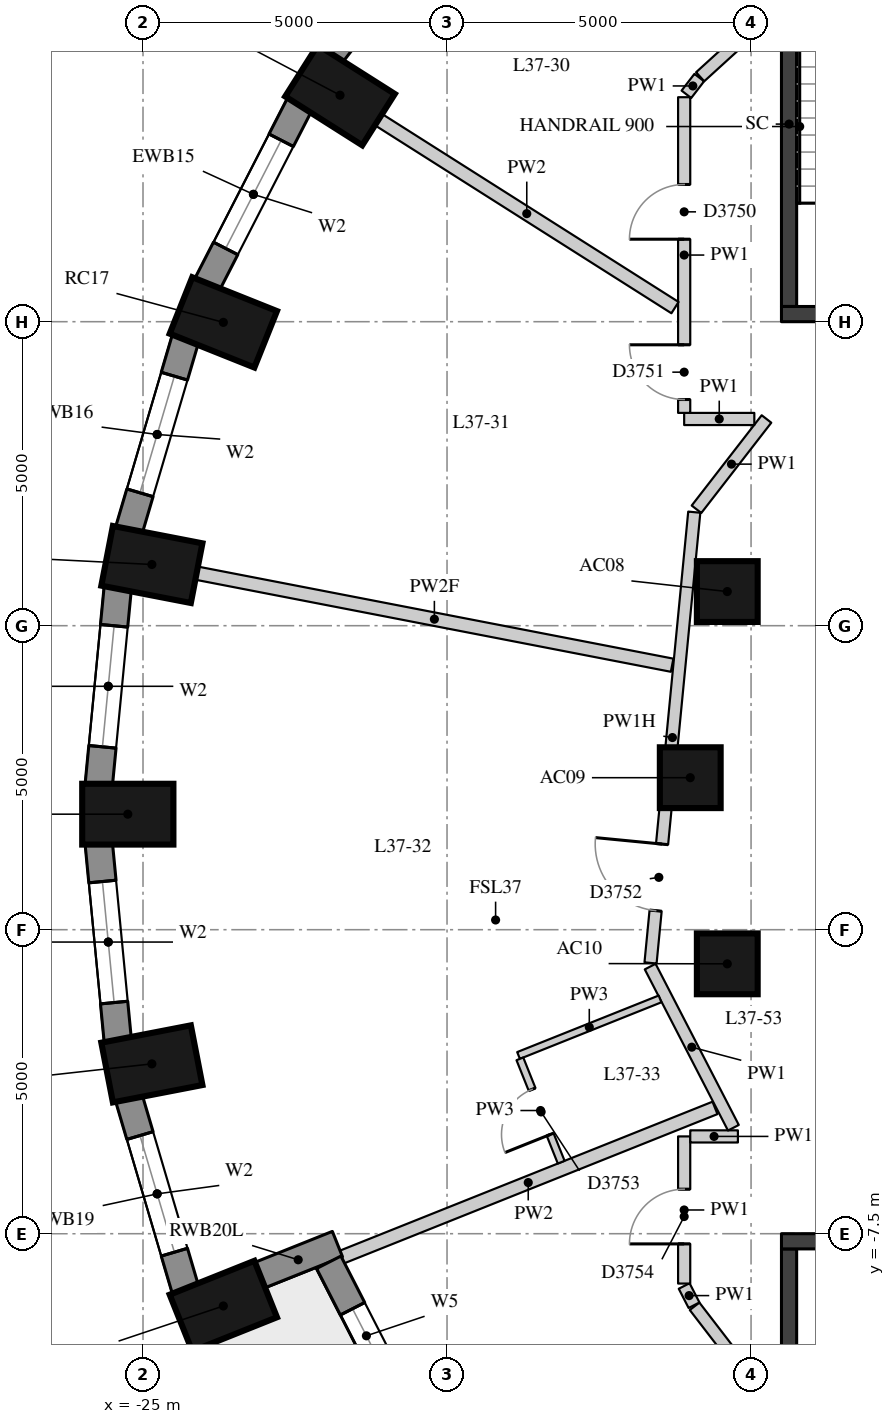
"""IFC4 building model, lengths in metres.
Left out: names, types, materials, properties, quantities, classifications, styles, units other than length and angle.
Written with IfcOpenShell. Run it as: python <this file> out.ifc"""

import sys

from ifc_helpers import new_model, si_unit, direction, frame, frame_2d, origin, origin_2d, place, context, subcontext, project, spatial, rectangle, extrude, element, fill, save


model = new_model("IFC4")
c1 = context("Model", 3, precision=1e-05, world=origin(), true_north=direction((0.0, 1.0)))
c2 = subcontext(c1, "Body", "Model", "MODEL_VIEW")
j1 = project(units=[si_unit("LENGTHUNIT", "METRE"), si_unit("PLANEANGLEUNIT", "RADIAN")], contexts=[c1])
p1 = place(None, origin())
s1 = spatial("IfcSite", under=j1, at=p1, CompositionType="ELEMENT")
p2 = place(p1, origin())
s2 = spatial("IfcBuilding", under=s1, at=p2, CompositionType="ELEMENT")
p3 = place(p2, frame((0.0, 0.0, 131.8)))
s3 = spatial("IfcBuildingStorey", under=s2, at=p3, CompositionType="ELEMENT", Elevation=131.8)
for number, where, z_axis, x_axis in (
    (1, (-21.76, 11.225, 0.0), (0.0, 0.0, 1.0), (-0.845, 0.536, 0.0)),
    (2, (-23.679, 7.489, 0.0), (0.0, 0.0, 1.0), (-0.929, 0.371, 0.0)),
    (3, (-24.854, 3.507, 0.0), (0.0, 0.0, 1.0), (-0.982, 0.19, 0.0)),
    (4, (-25.25, -0.6, 0.0), (0.0, 0.0, 1.0), (-1.0, 0.0, 0.0)),
    (5, (-24.854, -4.707, 0.0), (0.0, 0.0, 1.0), (-0.982, -0.19, 0.0)),
    (6, (-23.679, -8.689, 0.0), (0.0, 0.0, 1.0), (-0.929, -0.371, 0.0)),
):
    element("IfcColumn", number, at=place(p3, frame(where, z_axis=z_axis, x_axis=x_axis)), inside=s3, PredefinedType="COLUMN", context=c2, shape_type="SweptSolid", body=[
        extrude(rectangle(XDim=1.5, YDim=1.0, at=origin_2d()), origin(), (0.0, 0.0, 1.0), 3.3),
    ])
for number, where, z_axis, x_axis in (
    (7, (-15.391, 3.062, 0.0), (0.0, 0.0, 1.0), (1.0, 0.0, 0.0)),
    (8, (-16.0, 0.0, 0.0), (0.0, 0.0, 1.0), (1.0, 0.0, 0.0)),
    (9, (-15.391, -3.062, 0.0), (0.0, 0.0, 1.0), (1.0, 0.0, 0.0)),
):
    element("IfcColumn", number, at=place(p3, frame(where, z_axis=z_axis, x_axis=x_axis)), inside=s3, PredefinedType="COLUMN", context=c2, shape_type="SweptSolid", body=[
        extrude(rectangle(XDim=1.0, YDim=1.0, at=origin_2d()), origin(), (0.0, 0.0, 1.0), 3.3),
    ])
p4 = place(p3, frame((-19.835, 14.575, 0.0), z_axis=(0.0, 0.0, 1.0), x_axis=(-0.610693945156, -0.791866721961, 0.0)))
e10 = element("IfcWall", 10, at=p4, inside=s3, PredefinedType="SOLIDWALL", context=c2, shape_type="SweptSolid", body=[
    extrude(rectangle(XDim=3.395, YDim=0.45, at=frame_2d((1.697, 0.0))), origin(), (0.0, 0.0, 1.0), 2.85),
])
p5 = place(p4, frame((0.697, 0.0, 0.4)))
e11 = element("IfcOpeningElement", 11, at=p5, cuts=e10, PredefinedType="OPENING", context=c2, shape_type="SweptSolid", body=[
    extrude(rectangle(XDim=2.0, YDim=1.75, at=frame_2d((1.0, 0.875))), frame((0.0, 0.235, 0.0), z_axis=(0.0, -1.0, 0.0), x_axis=(1.0, 0.0, 0.0)), (0.0, 0.0, 1.0), 0.47),
])
p6 = place(p3, frame((-22.423, 11.077, 0.0), z_axis=(0.0, 0.0, 1.0), x_axis=(-0.456828186229, -0.889554949549, 0.0)))
e12 = element("IfcWall", 12, at=p6, inside=s3, PredefinedType="SOLIDWALL", context=c2, shape_type="SweptSolid", body=[
    extrude(rectangle(XDim=3.333, YDim=0.45, at=frame_2d((1.667, 0.0))), origin(), (0.0, 0.0, 1.0), 2.85),
])
p7 = place(p6, frame((0.666, 0.0, 0.4)))
e13 = element("IfcOpeningElement", 13, at=p7, cuts=e12, PredefinedType="OPENING", context=c2, shape_type="SweptSolid", body=[
    extrude(rectangle(XDim=2.0, YDim=1.75, at=frame_2d((1.0, 0.875))), frame((0.0, 0.235, 0.0), z_axis=(0.0, -1.0, 0.0), x_axis=(1.0, 0.0, 0.0)), (0.0, 0.0, 1.0), 0.47),
])
p8 = place(p3, frame((-24.302, 7.221, 0.0), z_axis=(0.0, 0.0, 1.0), x_axis=(-0.283071248438, -0.959098883488, 0.0)))
e14 = element("IfcWall", 14, at=p8, inside=s3, PredefinedType="SOLIDWALL", context=c2, shape_type="SweptSolid", body=[
    extrude(rectangle(XDim=3.286, YDim=0.45, at=frame_2d((1.643, 0.0))), origin(), (0.0, 0.0, 1.0), 2.85),
])
p9 = place(p8, frame((0.643, 0.0, 0.4)))
e15 = element("IfcOpeningElement", 15, at=p9, cuts=e14, PredefinedType="OPENING", context=c2, shape_type="SweptSolid", body=[
    extrude(rectangle(XDim=2.0, YDim=1.75, at=frame_2d((1.0, 0.875))), frame((0.0, 0.235, 0.0), z_axis=(0.0, -1.0, 0.0), x_axis=(1.0, 0.0, 0.0)), (0.0, 0.0, 1.0), 0.47),
])
p10 = place(p3, frame((-25.415, 3.126, 0.0), z_axis=(0.0, 0.0, 1.0), x_axis=(-0.095967726544, -0.995384446062, 0.0)))
e16 = element("IfcWall", 16, at=p10, inside=s3, PredefinedType="SOLIDWALL", context=c2, shape_type="SweptSolid", body=[
    extrude(rectangle(XDim=3.261, YDim=0.45, at=frame_2d((1.631, 0.0))), origin(), (0.0, 0.0, 1.0), 2.85),
])
p11 = place(p10, frame((0.631, 0.0, 0.4)))
e17 = element("IfcOpeningElement", 17, at=p11, cuts=e16, PredefinedType="OPENING", context=c2, shape_type="SweptSolid", body=[
    extrude(rectangle(XDim=2.0, YDim=1.75, at=frame_2d((1.0, 0.875))), frame((0.0, 0.235, 0.0), z_axis=(0.0, -1.0, 0.0), x_axis=(1.0, 0.0, 0.0)), (0.0, 0.0, 1.0), 0.47),
])
p12 = place(p3, frame((-25.728, -1.08, 0.0), z_axis=(0.0, 0.0, 1.0), x_axis=(0.095967726544, -0.995384446062, 0.0)))
e18 = element("IfcWall", 18, at=p12, inside=s3, PredefinedType="SOLIDWALL", context=c2, shape_type="SweptSolid", body=[
    extrude(rectangle(XDim=3.261, YDim=0.45, at=frame_2d((1.631, 0.0))), origin(), (0.0, 0.0, 1.0), 2.85),
])
p13 = place(p12, frame((0.631, 0.0, 0.4)))
e19 = element("IfcOpeningElement", 19, at=p13, cuts=e18, PredefinedType="OPENING", context=c2, shape_type="SweptSolid", body=[
    extrude(rectangle(XDim=2.0, YDim=1.75, at=frame_2d((1.0, 0.875))), frame((0.0, 0.235, 0.0), z_axis=(0.0, -1.0, 0.0), x_axis=(1.0, 0.0, 0.0)), (0.0, 0.0, 1.0), 0.47),
])
p14 = place(p3, frame((-25.232, -5.269, 0.0), z_axis=(0.0, 0.0, 1.0), x_axis=(0.283051078697, -0.959104836214, 0.0)))
e20 = element("IfcWall", 20, at=p14, inside=s3, PredefinedType="SOLIDWALL", context=c2, shape_type="SweptSolid", body=[
    extrude(rectangle(XDim=3.286, YDim=0.45, at=frame_2d((1.643, 0.0))), origin(), (0.0, 0.0, 1.0), 2.85),
])
p15 = place(p14, frame((0.643, 0.0, 0.4)))
e21 = element("IfcOpeningElement", 21, at=p15, cuts=e20, PredefinedType="OPENING", context=c2, shape_type="SweptSolid", body=[
    extrude(rectangle(XDim=2.0, YDim=1.75, at=frame_2d((1.0, 0.875))), frame((0.0, 0.235, 0.0), z_axis=(0.0, -1.0, 0.0), x_axis=(1.0, 0.0, 0.0)), (0.0, 0.0, 1.0), 0.47),
])
p16 = place(p3, frame((-23.093, -8.187, 0.0), z_axis=(0.0, 0.0, 1.0), x_axis=(0.928549333349, 0.371209018665, 0.0)))
e22 = element("IfcWall", 22, at=p16, inside=s3, PredefinedType="SOLIDWALL", context=c2, shape_type="SweptSolid", body=[
    extrude(rectangle(XDim=1.39, YDim=0.45, at=frame_2d((0.695, 0.0))), origin(), (0.0, 0.0, 1.0), 2.85),
])
p17 = place(p3, frame((-21.945, -7.97, 0.0), z_axis=(0.0, 0.0, 1.0), x_axis=(0.455905146579, -0.89002836883, 0.0)))
e23 = element("IfcWall", 23, at=p17, inside=s3, PredefinedType="SOLIDWALL", context=c2, shape_type="SweptSolid", body=[
    extrude(rectangle(XDim=3.867, YDim=0.45, at=frame_2d((1.934, 0.0))), origin(), (0.0, 0.0, 1.0), 2.85),
])
p18 = place(p17, frame((0.858, 0.0, 0.4)))
e24 = element("IfcOpeningElement", 24, at=p18, cuts=e23, PredefinedType="OPENING", context=c2, shape_type="SweptSolid", body=[
    extrude(rectangle(XDim=1.0, YDim=1.75, at=frame_2d((0.5, 0.875))), frame((0.0, 0.235, 0.0), z_axis=(0.0, -1.0, 0.0), x_axis=(1.0, 0.0, 0.0)), (0.0, 0.0, 1.0), 0.47),
])
p19 = place(p17, frame((2.009, 0.0, 0.0)))
e25 = element("IfcOpeningElement", 25, at=p19, cuts=e23, PredefinedType="OPENING", context=c2, shape_type="SweptSolid", body=[
    extrude(rectangle(XDim=1.0, YDim=2.15, at=frame_2d((0.5, 1.075))), frame((0.0, 0.235, 0.0), z_axis=(0.0, -1.0, 0.0), x_axis=(1.0, 0.0, 0.0)), (0.0, 0.0, 1.0), 0.47),
])
p20 = place(p3, frame((-14.375, 7.75, -0.28), z_axis=(0.0, 0.0, 1.0), x_axis=(0.0, 1.0, 0.0)))
e26 = element("IfcWall", 26, at=p20, inside=s3, PredefinedType="SHEAR", context=c2, shape_type="SweptSolid", body=[
    extrude(rectangle(XDim=6.0, YDim=0.25, at=frame_2d((3.0, 0.0))), origin(), (0.0, 0.0, 1.0), 3.13),
])
p21 = place(p3, frame((-14.5, 7.625, -0.28), z_axis=(0.0, 0.0, 1.0), x_axis=(1.0, 0.0, 0.0)))
e27 = element("IfcWall", 27, at=p21, inside=s3, PredefinedType="SHEAR", context=c2, shape_type="SweptSolid", body=[
    extrude(rectangle(XDim=5.2, YDim=0.25, at=frame_2d((2.6, 0.0))), origin(), (0.0, 0.0, 1.0), 3.13),
])
p22 = place(p3, frame((-14.375, -13.75, -0.28), z_axis=(0.0, 0.0, 1.0), x_axis=(0.0, 1.0, 0.0)))
e28 = element("IfcWall", 28, at=p22, inside=s3, PredefinedType="SHEAR", context=c2, shape_type="SweptSolid", body=[
    extrude(rectangle(XDim=6.0, YDim=0.25, at=frame_2d((3.0, 0.0))), origin(), (0.0, 0.0, 1.0), 3.13),
])
p23 = place(p3, frame((-14.5, -7.625, -0.28), z_axis=(0.0, 0.0, 1.0), x_axis=(1.0, 0.0, 0.0)))
e29 = element("IfcWall", 29, at=p23, inside=s3, PredefinedType="SHEAR", context=c2, shape_type="SweptSolid", body=[
    extrude(rectangle(XDim=5.2, YDim=0.25, at=frame_2d((2.6, 0.0))), origin(), (0.0, 0.0, 1.0), 3.13),
])
p24 = place(p3, frame((-14.573, -10.456, 0.0), z_axis=(0.0, 0.0, 1.0), x_axis=(-0.60967360535, 0.792652568872, 0.0)))
e30 = element("IfcWall", 30, at=p24, inside=s3, PredefinedType="PARTITIONING", context=c2, shape_type="SweptSolid", body=[
    extrude(rectangle(XDim=2.223, YDim=0.2, at=frame_2d((1.111, 0.0))), origin(), (0.0, 0.0, 1.0), 2.85),
])
p25 = place(p3, frame((-15.938, -8.676, 0.0), z_axis=(0.0, 0.0, 1.0), x_axis=(-0.456525695549, 0.889710227717, 0.0)))
e31 = element("IfcWall", 31, at=p25, inside=s3, PredefinedType="PARTITIONING", context=c2, shape_type="SweptSolid", body=[
    extrude(rectangle(XDim=0.356, YDim=0.2, at=frame_2d((0.178, 0.0))), origin(), (0.0, 0.0, 1.0), 2.85),
])
p26 = place(p3, frame((-16.1, -8.32, 0.0), z_axis=(0.0, 0.0, 1.0), x_axis=(0.0, 1.0, 0.0)))
e32 = element("IfcWall", 32, at=p26, inside=s3, PredefinedType="PARTITIONING", context=c2, shape_type="SweptSolid", body=[
    extrude(rectangle(XDim=2.42, YDim=0.2, at=frame_2d((1.21, 0.0))), origin(), (0.0, 0.0, 1.0), 2.85),
])
p27 = place(p26, frame((0.652, 0.0, 0.0)))
e33 = element("IfcOpeningElement", 33, at=p27, cuts=e32, PredefinedType="OPENING", context=c2, shape_type="SweptSolid", body=[
    extrude(rectangle(XDim=0.9, YDim=2.1, at=frame_2d((0.45, 1.05))), frame((0.0, 0.11, 0.0), z_axis=(0.0, -1.0, 0.0), x_axis=(1.0, 0.0, 0.0)), (0.0, 0.0, 1.0), 0.22),
])
p28 = place(p3, frame((-16.0, -5.9, 0.0), z_axis=(0.0, 0.0, 1.0), x_axis=(1.0, 0.0, 0.0)))
e34 = element("IfcWall", 34, at=p28, inside=s3, PredefinedType="PARTITIONING", context=c2, shape_type="SweptSolid", body=[
    extrude(rectangle(XDim=0.784, YDim=0.2, at=frame_2d((0.392, 0.0))), origin(), (0.0, 0.0, 1.0), 2.85),
])
p29 = place(p3, frame((-15.291, -5.757, 0.0), z_axis=(0.0, 0.0, 1.0), x_axis=(-0.45873256191, 0.888574384418, 0.0)))
e35 = element("IfcWall", 35, at=p29, inside=s3, PredefinedType="PARTITIONING", context=c2, shape_type="SweptSolid", body=[
    extrude(rectangle(XDim=2.983, YDim=0.2, at=frame_2d((1.491, 0.0))), origin(), (0.0, 0.0, 1.0), 2.85),
])
p30 = place(p3, frame((-16.653, -3.047, 0.0), z_axis=(0.0, 0.0, 1.0), x_axis=(0.096559879606, 0.995327177189, 0.0)))
e36 = element("IfcWall", 36, at=p30, inside=s3, PredefinedType="PARTITIONING", context=c2, shape_type="SweptSolid", body=[
    extrude(rectangle(XDim=7.449, YDim=0.2, at=frame_2d((3.724, 0.0))), origin(), (0.0, 0.0, 1.0), 2.35),
])
p31 = place(p30, frame((0.864, 0.0, 0.0)))
e37 = element("IfcOpeningElement", 37, at=p31, cuts=e36, PredefinedType="OPENING", context=c2, shape_type="SweptSolid", body=[
    extrude(rectangle(XDim=1.1, YDim=2.1, at=frame_2d((0.55, 1.05))), frame((0.0, 0.11, 0.0), z_axis=(0.0, -1.0, 0.0), x_axis=(1.0, 0.0, 0.0)), (0.0, 0.0, 1.0), 0.22),
])
p32 = place(p3, frame((-15.897, 4.415, 0.0), z_axis=(0.0, 0.0, 1.0), x_axis=(0.612626457361, 0.790372585393, 0.0)))
e38 = element("IfcWall", 38, at=p32, inside=s3, PredefinedType="PARTITIONING", context=c2, shape_type="SweptSolid", body=[
    extrude(rectangle(XDim=1.879, YDim=0.2, at=frame_2d((0.939, 0.0))), origin(), (0.0, 0.0, 1.0), 2.85),
])
p33 = place(p3, frame((-14.946, 5.9, 0.0), z_axis=(0.0, 0.0, 1.0), x_axis=(-1.0, 0.0, 0.0)))
e39 = element("IfcWall", 39, at=p33, inside=s3, PredefinedType="PARTITIONING", context=c2, shape_type="SweptSolid", body=[
    extrude(rectangle(XDim=1.154, YDim=0.2, at=frame_2d((0.577, 0.0))), origin(), (0.0, 0.0, 1.0), 2.85),
])
p34 = place(p3, frame((-16.1, 6.0, 0.0), z_axis=(0.0, 0.0, 1.0), x_axis=(0.0, 1.0, 0.0)))
e40 = element("IfcWall", 40, at=p34, inside=s3, PredefinedType="PARTITIONING", context=c2, shape_type="SweptSolid", body=[
    extrude(rectangle(XDim=5.192, YDim=0.2, at=frame_2d((2.596, 0.0))), origin(), (0.0, 0.0, 1.0), 2.85),
])
p35 = place(p34, frame((2.857, 0.0, 0.0)))
e41 = element("IfcOpeningElement", 41, at=p35, cuts=e40, PredefinedType="OPENING", context=c2, shape_type="SweptSolid", body=[
    extrude(rectangle(XDim=0.9, YDim=2.1, at=frame_2d((0.45, 1.05))), frame((0.0, 0.11, 0.0), z_axis=(0.0, -1.0, 0.0), x_axis=(1.0, 0.0, 0.0)), (0.0, 0.0, 1.0), 0.22),
])
p36 = place(p34, frame((0.22, 0.0, 0.0)))
e42 = element("IfcOpeningElement", 42, at=p36, cuts=e40, PredefinedType="OPENING", context=c2, shape_type="SweptSolid", body=[
    extrude(rectangle(XDim=0.9, YDim=2.1, at=frame_2d((0.45, 1.05))), frame((0.0, 0.11, 0.0), z_axis=(0.0, -1.0, 0.0), x_axis=(1.0, 0.0, 0.0)), (0.0, 0.0, 1.0), 0.22),
])
p37 = place(p3, frame((-16.063, 11.24, 0.0), z_axis=(0.0, 0.0, 1.0), x_axis=(0.609744747854, 0.792597844096, 0.0)))
e43 = element("IfcWall", 43, at=p37, inside=s3, PredefinedType="PARTITIONING", context=c2, shape_type="SweptSolid", body=[
    extrude(rectangle(XDim=0.347, YDim=0.2, at=frame_2d((0.174, 0.0))), origin(), (0.0, 0.0, 1.0), 2.85),
])
p38 = place(p3, frame((-15.837, 11.528, 0.0), z_axis=(0.0, 0.0, 1.0), x_axis=(0.739402681643, 0.673263450946, 0.0)))
e44 = element("IfcWall", 44, at=p38, inside=s3, PredefinedType="PARTITIONING", context=c2, shape_type="SweptSolid", body=[
    extrude(rectangle(XDim=1.728, YDim=0.2, at=frame_2d((0.864, 0.0))), origin(), (0.0, 0.0, 1.0), 2.85),
])
p39 = place(p3, frame((-21.126, 10.823, 0.0), z_axis=(0.0, 0.0, 1.0), x_axis=(0.844518840625, -0.535525842355, 0.0)))
e45 = element("IfcWall", 45, at=p39, inside=s3, PredefinedType="PARTITIONING", context=c2, shape_type="SweptSolid", body=[
    extrude(rectangle(XDim=5.773, YDim=0.22, at=frame_2d((2.887, 0.0))), origin(), (0.0, 0.0, 1.0), 2.85),
])
p40 = place(p3, frame((-24.118, 3.364, 0.0), z_axis=(0.0, 0.0, 1.0), x_axis=(0.981757892546, -0.190135321348, 0.0)))
e46 = element("IfcWall", 46, at=p40, inside=s3, PredefinedType="PARTITIONING", context=c2, shape_type="SweptSolid", body=[
    extrude(rectangle(XDim=7.965, YDim=0.22, at=frame_2d((3.982, 0.0))), origin(), (0.0, 0.0, 1.0), 2.3),
])
p41 = place(p3, frame((-21.736, -7.887, 0.0), z_axis=(0.0, 0.0, 1.0), x_axis=(0.928547942842, 0.371212496884, 0.0)))
e47 = element("IfcWall", 47, at=p41, inside=s3, PredefinedType="PARTITIONING", context=c2, shape_type="SweptSolid", body=[
    extrude(rectangle(XDim=6.615, YDim=0.22, at=frame_2d((3.308, 0.0))), origin(), (0.0, 0.0, 1.0), 2.85),
])
p42 = place(p3, frame((-16.497, -3.638, 0.0), z_axis=(0.0, 0.0, 1.0), x_axis=(-0.92857071808, -0.371155522019, 0.0)))
e48 = element("IfcWall", 48, at=p42, inside=s3, PredefinedType="PARTITIONING", context=c2, shape_type="SweptSolid", body=[
    extrude(rectangle(XDim=2.506, YDim=0.12, at=frame_2d((1.253, 0.0))), origin(), (0.0, 0.0, 1.0), 2.85),
])
p43 = place(p3, frame((-18.802, -4.624, 0.0), z_axis=(0.0, 0.0, 1.0), x_axis=(0.371229680537, -0.928541073022, 0.0)))
e49 = element("IfcWall", 49, at=p43, inside=s3, PredefinedType="PARTITIONING", context=c2, shape_type="SweptSolid", body=[
    extrude(rectangle(XDim=1.83, YDim=0.12, at=frame_2d((0.915, 0.0))), origin(), (0.0, 0.0, 1.0), 2.85),
])
p44 = place(p43, frame((0.54, 0.0, 0.0)))
e50 = element("IfcOpeningElement", 50, at=p44, cuts=e49, PredefinedType="OPENING", context=c2, shape_type="SweptSolid", body=[
    extrude(rectangle(XDim=0.8, YDim=2.1, at=frame_2d((0.4, 1.05))), frame((0.0, 0.07, 0.0), z_axis=(0.0, -1.0, 0.0), x_axis=(1.0, 0.0, 0.0)), (0.0, 0.0, 1.0), 0.14),
])
p45 = place(p7, origin())
e51 = element("IfcWindow", 51, at=p45, inside=s3, PartitioningType="SINGLE_PANEL", PredefinedType="WINDOW", context=c2, shape_type="SweptSolid", body=[
    extrude(rectangle(XDim=2.0, YDim=1.75, at=frame_2d((1.0, 0.875))), frame((0.0, 0.035, 0.0), z_axis=(0.0, -1.0, 0.0), x_axis=(1.0, 0.0, 0.0)), (0.0, 0.0, 1.0), 0.06),
])
fill(e13, e51)
p46 = place(p9, origin())
e52 = element("IfcWindow", 52, at=p46, inside=s3, PartitioningType="SINGLE_PANEL", PredefinedType="WINDOW", context=c2, shape_type="SweptSolid", body=[
    extrude(rectangle(XDim=2.0, YDim=1.75, at=frame_2d((1.0, 0.875))), frame((0.0, 0.035, 0.0), z_axis=(0.0, -1.0, 0.0), x_axis=(1.0, 0.0, 0.0)), (0.0, 0.0, 1.0), 0.06),
])
fill(e15, e52)
p47 = place(p11, origin())
e53 = element("IfcWindow", 53, at=p47, inside=s3, PartitioningType="SINGLE_PANEL", PredefinedType="WINDOW", context=c2, shape_type="SweptSolid", body=[
    extrude(rectangle(XDim=2.0, YDim=1.75, at=frame_2d((1.0, 0.875))), frame((0.0, 0.035, 0.0), z_axis=(0.0, -1.0, 0.0), x_axis=(1.0, 0.0, 0.0)), (0.0, 0.0, 1.0), 0.06),
])
fill(e17, e53)
p48 = place(p13, origin())
e54 = element("IfcWindow", 54, at=p48, inside=s3, PartitioningType="SINGLE_PANEL", PredefinedType="WINDOW", context=c2, shape_type="SweptSolid", body=[
    extrude(rectangle(XDim=2.0, YDim=1.75, at=frame_2d((1.0, 0.875))), frame((0.0, 0.035, 0.0), z_axis=(0.0, -1.0, 0.0), x_axis=(1.0, 0.0, 0.0)), (0.0, 0.0, 1.0), 0.06),
])
fill(e19, e54)
p49 = place(p15, origin())
e55 = element("IfcWindow", 55, at=p49, inside=s3, PartitioningType="SINGLE_PANEL", PredefinedType="WINDOW", context=c2, shape_type="SweptSolid", body=[
    extrude(rectangle(XDim=2.0, YDim=1.75, at=frame_2d((1.0, 0.875))), frame((0.0, 0.035, 0.0), z_axis=(0.0, -1.0, 0.0), x_axis=(1.0, 0.0, 0.0)), (0.0, 0.0, 1.0), 0.06),
])
fill(e21, e55)
p50 = place(p18, origin())
e56 = element("IfcWindow", 56, at=p50, inside=s3, PartitioningType="SINGLE_PANEL", PredefinedType="WINDOW", context=c2, shape_type="SweptSolid", body=[
    extrude(rectangle(XDim=1.0, YDim=1.75, at=frame_2d((0.5, 0.875))), frame((0.0, 0.035, 0.0), z_axis=(0.0, -1.0, 0.0), x_axis=(1.0, 0.0, 0.0)), (0.0, 0.0, 1.0), 0.06),
])
fill(e24, e56)
p51 = place(p35, origin())
e57 = element("IfcDoor", 57, at=p51, inside=s3, OperationType="SINGLE_SWING_LEFT", PredefinedType="DOOR", context=c2, shape_type="SweptSolid", body=[
    extrude(rectangle(XDim=0.9, YDim=2.1, at=frame_2d((0.45, 1.05))), frame((0.0, 0.025, 0.0), z_axis=(0.0, -1.0, 0.0), x_axis=(1.0, 0.0, 0.0)), (0.0, 0.0, 1.0), 0.05),
])
fill(e41, e57)
p52 = place(p36, origin())
e58 = element("IfcDoor", 58, at=p52, inside=s3, OperationType="SINGLE_SWING_RIGHT", PredefinedType="DOOR", context=c2, shape_type="SweptSolid", body=[
    extrude(rectangle(XDim=0.9, YDim=2.1, at=frame_2d((0.45, 1.05))), frame((0.0, 0.025, 0.0), z_axis=(0.0, -1.0, 0.0), x_axis=(1.0, 0.0, 0.0)), (0.0, 0.0, 1.0), 0.05),
])
fill(e42, e58)
p53 = place(p31, origin())
e59 = element("IfcDoor", 59, at=p53, inside=s3, OperationType="SINGLE_SWING_RIGHT", PredefinedType="DOOR", context=c2, shape_type="SweptSolid", body=[
    extrude(rectangle(XDim=1.1, YDim=2.1, at=frame_2d((0.55, 1.05))), frame((0.0, 0.025, 0.0), z_axis=(0.0, -1.0, 0.0), x_axis=(1.0, 0.0, 0.0)), (0.0, 0.0, 1.0), 0.05),
])
fill(e37, e59)
p54 = place(p44, origin())
e60 = element("IfcDoor", 60, at=p54, inside=s3, OperationType="SINGLE_SWING_LEFT", PredefinedType="DOOR", context=c2, shape_type="SweptSolid", body=[
    extrude(rectangle(XDim=0.8, YDim=2.1, at=frame_2d((0.4, 1.05))), frame((0.0, 0.025, 0.0), z_axis=(0.0, -1.0, 0.0), x_axis=(1.0, 0.0, 0.0)), (0.0, 0.0, 1.0), 0.05),
])
fill(e50, e60)
p55 = place(p27, origin())
e61 = element("IfcDoor", 61, at=p55, inside=s3, OperationType="SINGLE_SWING_LEFT", PredefinedType="DOOR", context=c2, shape_type="SweptSolid", body=[
    extrude(rectangle(XDim=0.9, YDim=2.1, at=frame_2d((0.45, 1.05))), frame((0.0, 0.025, 0.0), z_axis=(0.0, -1.0, 0.0), x_axis=(1.0, 0.0, 0.0)), (0.0, 0.0, 1.0), 0.05),
])
fill(e33, e61)
save(model, sys.argv[1])
